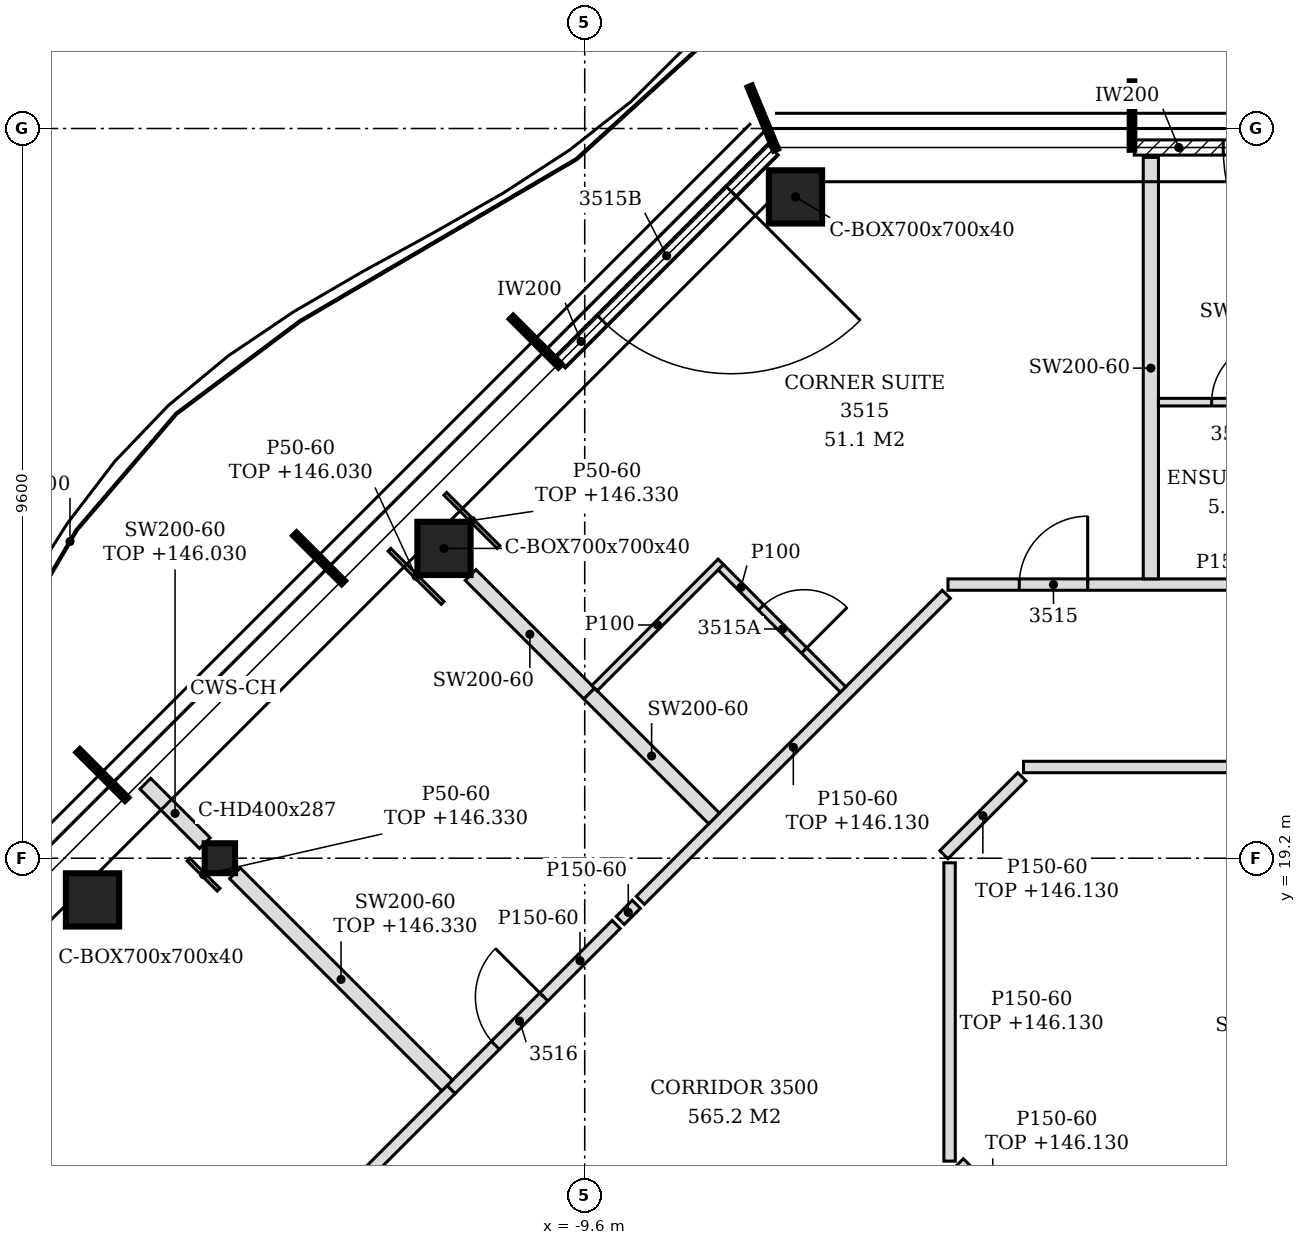
"""IFC4 building model, lengths in metres.
Left out: names, types, materials, properties, quantities, classifications, styles, units other than length and angle.
Written with IfcOpenShell. Run it as: python <this file> out.ifc"""

import sys

from ifc_helpers import new_model, si_unit, direction, frame, frame_2d, origin, origin_2d, place, context, subcontext, project, spatial, polyline, rectangle, hollow_rectangle, i_section, outline, extrude, element, fill, save


model = new_model("IFC4")
c1 = context("Model", 3, precision=1e-05, world=origin(), true_north=direction((0.0, 1.0)))
c2 = subcontext(c1, "Body", "Model", "MODEL_VIEW")
j1 = project(units=[si_unit("LENGTHUNIT", "METRE"), si_unit("PLANEANGLEUNIT", "RADIAN")], contexts=[c1])
p1 = place(None, origin())
s1 = spatial("IfcSite", under=j1, at=p1, CompositionType="ELEMENT")
p2 = place(p1, origin())
s2 = spatial("IfcBuilding", under=s1, at=p2, CompositionType="ELEMENT")
p3 = place(p2, frame((0.0, 0.0, 143.4)))
s3 = spatial("IfcBuildingStorey", under=s2, at=p3, CompositionType="ELEMENT", Elevation=143.4)
for number, where, z_axis, x_axis in (
    (1, (-6.827, 27.9, -0.15), (0.0, 0.0, 1.0), (1.0, 0.0, 0.0)),
    (2, (-11.451, 23.276, -0.15), (0.0, 0.0, 1.0), (1.0, 0.0, 0.0)),
    (3, (-16.076, 18.652, -0.15), (0.0, 0.0, 1.0), (1.0, 0.0, 0.0)),
):
    element("IfcColumn", number, at=place(p3, frame(where, z_axis=z_axis, x_axis=x_axis)), inside=s3, PredefinedType="COLUMN", context=c2, shape_type="SweptSolid", body=[
        extrude(hollow_rectangle(XDim=0.7, YDim=0.7, WallThickness=0.04, at=origin_2d()), origin(), (0.0, 0.0, 1.0), 3.6),
    ])
p4 = place(p3, frame((-14.4, 19.2, -0.15), z_axis=(0.0, 0.0, 1.0), x_axis=(1.0, 0.0, 0.0)))
e4 = element("IfcColumn", 4, at=p4, inside=s3, PredefinedType="COLUMN", context=c2, shape_type="SweptSolid", body=[
    extrude(i_section(OverallWidth=0.399, OverallDepth=0.393, WebThickness=0.023, FlangeThickness=0.037, FilletRadius=0.015, at=origin_2d()), origin(), (0.0, 0.0, 1.0), 3.6),
])
p5 = place(p3, frame((2.37, 28.55, 0.0), z_axis=(0.0, 0.0, 1.0), x_axis=(-1.0, 0.0, 0.0)))
e5 = element("IfcWall", 5, at=p5, inside=s3, PredefinedType="NOTDEFINED", context=c2, shape_type="SweptSolid", body=[
    extrude(rectangle(XDim=4.74, YDim=0.2, at=frame_2d((2.37, 0.0))), origin(), (0.0, 0.0, 1.0), 3.45),
])
p6 = place(p5, frame((1.17, 0.0, 0.0)))
e6 = element("IfcOpeningElement", 6, at=p6, cuts=e5, PredefinedType="OPENING", context=c2, shape_type="SweptSolid", body=[
    extrude(rectangle(XDim=2.4, YDim=2.4, at=frame_2d((1.2, 1.2))), frame((0.0, 0.11, 0.0), z_axis=(0.0, -1.0, 0.0), x_axis=(1.0, 0.0, 0.0)), (0.0, 0.0, 1.0), 0.22),
])
p7 = place(p3, frame((-7.125, 28.522, 0.0), z_axis=(0.0, 0.0, 1.0), x_axis=(-0.707106781187, -0.707106781187, 0.0)))
e7 = element("IfcWall", 7, at=p7, inside=s3, PredefinedType="NOTDEFINED", context=c2, shape_type="SweptSolid", body=[
    extrude(rectangle(XDim=3.962, YDim=0.2, at=frame_2d((1.981, 0.0))), origin(), (0.0, 0.0, 1.0), 3.45),
])
p8 = place(p7, frame((0.775, 0.0, 0.0)))
e8 = element("IfcOpeningElement", 8, at=p8, cuts=e7, PredefinedType="OPENING", context=c2, shape_type="SweptSolid", body=[
    extrude(rectangle(XDim=2.4, YDim=2.4, at=frame_2d((1.2, 1.2))), frame((0.0, 0.11, 0.0), z_axis=(0.0, -1.0, 0.0), x_axis=(1.0, 0.0, 0.0)), (0.0, 0.0, 1.0), 0.22),
])
p9 = place(p3, frame((-15.675, 11.84, 0.0), z_axis=(0.0, 0.0, 1.0), x_axis=(0.707206735496, 0.707006812746, 0.0)))
e9 = element("IfcWall", 9, at=p9, inside=s3, PredefinedType="PARTITIONING", context=c2, shape_type="SweptSolid", body=[
    extrude(rectangle(XDim=6.106, YDim=0.15, at=frame_2d((3.053, 0.0))), origin(), (0.0, 0.0, 1.0), 2.93),
])
p10 = place(p9, frame((2.656, 0.0, 0.0)))
e10 = element("IfcOpeningElement", 10, at=p10, cuts=e9, PredefinedType="OPENING", context=c2, shape_type="SweptSolid", body=[
    extrude(rectangle(XDim=0.9, YDim=2.1, at=frame_2d((0.45, 1.05))), frame((0.0, 0.085, 0.0), z_axis=(0.0, -1.0, 0.0), x_axis=(1.0, 0.0, 0.0)), (0.0, 0.0, 1.0), 0.17),
])
p11 = place(p3, frame((-3.792, 14.314, 0.0), z_axis=(0.0, 0.0, 1.0), x_axis=(-0.707499182195, 0.706714162298, 0.0)))
e11 = element("IfcWall", 11, at=p11, inside=s3, PredefinedType="PARTITIONING", context=c2, shape_type="SweptSolid", body=[
    extrude(rectangle(XDim=1.244, YDim=0.15, at=frame_2d((0.622, 0.0))), origin(), (0.0, 0.0, 1.0), 2.73),
])
p12 = place(p3, frame((-4.8, 15.215, 0.0), z_axis=(0.0, 0.0, 1.0), x_axis=(0.0, 1.0, 0.0)))
e12 = element("IfcWall", 12, at=p12, inside=s3, PredefinedType="PARTITIONING", context=c2, shape_type="SweptSolid", body=[
    extrude(rectangle(XDim=3.925, YDim=0.15, at=frame_2d((1.962, 0.0))), origin(), (0.0, 0.0, 1.0), 2.73),
])
p13 = place(p3, frame((-11.357, 16.157, 0.0), z_axis=(0.0, 0.0, 1.0), x_axis=(0.707106781187, 0.707106781187, 0.0)))
e13 = element("IfcWall", 13, at=p13, inside=s3, PredefinedType="PARTITIONING", context=c2, shape_type="SweptSolid", body=[
    extrude(rectangle(XDim=3.071, YDim=0.15, at=frame_2d((1.535, 0.0))), origin(), (0.0, 0.0, 1.0), 3.45),
])
p14 = place(p13, frame((0.823, 0.0, 0.0)))
e14 = element("IfcOpeningElement", 14, at=p14, cuts=e13, PredefinedType="OPENING", context=c2, shape_type="SweptSolid", body=[
    extrude(rectangle(XDim=0.9, YDim=2.1, at=frame_2d((0.45, 1.05))), frame((0.0, 0.085, 0.0), z_axis=(0.0, -1.0, 0.0), x_axis=(1.0, 0.0, 0.0)), (0.0, 0.0, 1.0), 0.17),
])
p15 = place(p3, frame((-11.41, 16.21, 0.0), z_axis=(0.0, 0.0, 1.0), x_axis=(-0.707106781187, 0.707106781187, 0.0)))
e15 = element("IfcWall", 15, at=p15, inside=s3, PredefinedType="PARTITIONING", context=c2, shape_type="SweptSolid", body=[
    extrude(rectangle(XDim=3.948, YDim=0.2, at=frame_2d((1.974, 0.0))), origin(), (0.0, 0.0, 1.0), 2.93),
])
p16 = place(p3, frame((-9.133, 18.382, 0.0), z_axis=(0.0, 0.0, 1.0), x_axis=(0.707106781187, 0.707106781187, 0.0)))
e16 = element("IfcWall", 16, at=p16, inside=s3, PredefinedType="PARTITIONING", context=c2, shape_type="SweptSolid", body=[
    extrude(rectangle(XDim=0.3, YDim=0.15, at=frame_2d((0.15, 0.0))), origin(), (0.0, 0.0, 1.0), 3.45),
])
p17 = place(p3, frame((-8.868, 18.647, 0.0), z_axis=(0.0, 0.0, 1.0), x_axis=(0.707085337138, 0.707128224585, 0.0)))
e17 = element("IfcWall", 17, at=p17, inside=s3, PredefinedType="PARTITIONING", context=c2, shape_type="SweptSolid", body=[
    extrude(rectangle(XDim=5.693, YDim=0.15, at=frame_2d((2.846, 0.0))), origin(), (0.0, 0.0, 1.0), 2.73),
])
p18 = place(p3, frame((-4.875, 19.246, 0.0), z_axis=(0.0, 0.0, 1.0), x_axis=(0.707106781187, 0.707106781187, 0.0)))
e18 = element("IfcWall", 18, at=p18, inside=s3, PredefinedType="PARTITIONING", context=c2, shape_type="SweptSolid", body=[
    extrude(rectangle(XDim=1.451, YDim=0.15, at=frame_2d((0.726, 0.0))), origin(), (0.0, 0.0, 1.0), 2.73),
])
p19 = place(p3, frame((-14.598, 19.398, 0.0), z_axis=(0.0, 0.0, 1.0), x_axis=(-0.707106781187, 0.707106781187, 0.0)))
e19 = element("IfcWall", 19, at=p19, inside=s3, PredefinedType="PARTITIONING", context=c2, shape_type="SweptSolid", body=[
    extrude(rectangle(XDim=1.107, YDim=0.2, at=frame_2d((0.554, 0.0))), origin(), (0.0, 0.0, 1.0), 2.63),
])
p20 = place(p3, frame((-7.898, 19.723, 0.0), z_axis=(0.0, 0.0, 1.0), x_axis=(-0.707106781187, 0.707106781187, 0.0)))
e20 = element("IfcWall", 20, at=p20, inside=s3, PredefinedType="PARTITIONING", context=c2, shape_type="SweptSolid", body=[
    extrude(rectangle(XDim=2.325, YDim=0.2, at=frame_2d((1.163, 0.0))), origin(), (0.0, 0.0, 1.0), 3.45),
])
p21 = place(p3, frame((-3.827, 20.4, 0.0), z_axis=(0.0, 0.0, 1.0), x_axis=(1.0, 0.0, 0.0)))
e21 = element("IfcWall", 21, at=p21, inside=s3, PredefinedType="PARTITIONING", context=c2, shape_type="SweptSolid", body=[
    extrude(rectangle(XDim=8.702, YDim=0.15, at=frame_2d((4.351, 0.0))), origin(), (0.0, 0.0, 1.0), 3.45),
])
p22 = place(p3, frame((-9.542, 21.367, 0.0), z_axis=(0.0, 0.0, 1.0), x_axis=(-0.707217500167, 0.706996044867, 0.0)))
e22 = element("IfcWall", 22, at=p22, inside=s3, PredefinedType="PARTITIONING", context=c2, shape_type="SweptSolid", body=[
    extrude(rectangle(XDim=2.205, YDim=0.2, at=frame_2d((1.103, 0.0))), origin(), (0.0, 0.0, 1.0), 3.45),
])
p23 = place(p3, frame((-9.471, 21.438, 0.0), z_axis=(0.0, 0.0, 1.0), x_axis=(0.707054828152, 0.707158730404, 0.0)))
e23 = element("IfcWall", 23, at=p23, inside=s3, PredefinedType="PARTITIONING", context=c2, shape_type="SweptSolid", body=[
    extrude(rectangle(XDim=2.35, YDim=0.1, at=frame_2d((1.175, 0.0))), origin(), (0.0, 0.0, 1.0), 3.45),
])
p24 = place(p3, frame((-6.201, 21.42, 0.0), z_axis=(0.0, 0.0, 1.0), x_axis=(-0.707106781187, 0.707106781187, 0.0)))
e24 = element("IfcWall", 24, at=p24, inside=s3, PredefinedType="PARTITIONING", context=c2, shape_type="SweptSolid", body=[
    extrude(rectangle(XDim=2.275, YDim=0.1, at=frame_2d((1.137, 0.0))), origin(), (0.0, 0.0, 1.0), 3.45),
])
p25 = place(p24, frame((0.725, 0.0, 0.0)))
e25 = element("IfcOpeningElement", 25, at=p25, cuts=e24, PredefinedType="OPENING", context=c2, shape_type="SweptSolid", body=[
    extrude(rectangle(XDim=0.8, YDim=2.1, at=frame_2d((0.4, 1.05))), frame((0.0, 0.06, 0.0), z_axis=(0.0, -1.0, 0.0), x_axis=(1.0, 0.0, 0.0)), (0.0, 0.0, 1.0), 0.12),
])
p26 = place(p3, frame((-4.821, 22.8, 0.0), z_axis=(0.0, 0.0, 1.0), x_axis=(1.0, 0.0, 0.0)))
e26 = element("IfcWall", 26, at=p26, inside=s3, PredefinedType="PARTITIONING", context=c2, shape_type="SweptSolid", body=[
    extrude(outline(polyline([(0.0, 0.0), (24.042, 0.0), (24.042, 2.73), (23.871, 2.73), (23.869, 3.45), (12.171, 3.45), (12.169, 2.73), (11.871, 2.73), (11.869, 3.45), (0.171, 3.45), (0.169, 2.73), (0.0, 2.73), (0.0, 0.0)])), frame((0.0, 0.075, 0.0), z_axis=(0.0, -1.0, 0.0), x_axis=(1.0, 0.0, 0.0)), (0.0, 0.0, 1.0), 0.15),
])
p27 = place(p26, frame((22.205, 0.0, 0.0)))
e27 = element("IfcOpeningElement", 27, at=p27, cuts=e26, PredefinedType="OPENING", context=c2, shape_type="SweptSolid", body=[
    extrude(rectangle(XDim=0.9, YDim=2.1, at=frame_2d((0.45, 1.05))), frame((0.0, 0.085, 0.0), z_axis=(0.0, -1.0, 0.0), x_axis=(1.0, 0.0, 0.0)), (0.0, 0.0, 1.0), 0.17),
])
p28 = place(p26, frame((19.785, 0.0, 0.0)))
e28 = element("IfcOpeningElement", 28, at=p28, cuts=e26, PredefinedType="OPENING", context=c2, shape_type="SweptSolid", body=[
    extrude(rectangle(XDim=0.9, YDim=2.1, at=frame_2d((0.45, 1.05))), frame((0.0, 0.085, 0.0), z_axis=(0.0, -1.0, 0.0), x_axis=(1.0, 0.0, 0.0)), (0.0, 0.0, 1.0), 0.17),
])
p29 = place(p26, frame((15.109, 0.0, 0.0)))
e29 = element("IfcOpeningElement", 29, at=p29, cuts=e26, PredefinedType="OPENING", context=c2, shape_type="SweptSolid", body=[
    extrude(rectangle(XDim=0.9, YDim=2.1, at=frame_2d((0.45, 1.05))), frame((0.0, 0.085, 0.0), z_axis=(0.0, -1.0, 0.0), x_axis=(1.0, 0.0, 0.0)), (0.0, 0.0, 1.0), 0.17),
])
p30 = place(p26, frame((10.433, 0.0, 0.0)))
e30 = element("IfcOpeningElement", 30, at=p30, cuts=e26, PredefinedType="OPENING", context=c2, shape_type="SweptSolid", body=[
    extrude(rectangle(XDim=0.9, YDim=2.1, at=frame_2d((0.45, 1.05))), frame((0.0, 0.085, 0.0), z_axis=(0.0, -1.0, 0.0), x_axis=(1.0, 0.0, 0.0)), (0.0, 0.0, 1.0), 0.17),
])
p31 = place(p26, frame((5.757, 0.0, 0.0)))
e31 = element("IfcOpeningElement", 31, at=p31, cuts=e26, PredefinedType="OPENING", context=c2, shape_type="SweptSolid", body=[
    extrude(rectangle(XDim=0.9, YDim=2.1, at=frame_2d((0.45, 1.05))), frame((0.0, 0.085, 0.0), z_axis=(0.0, -1.0, 0.0), x_axis=(1.0, 0.0, 0.0)), (0.0, 0.0, 1.0), 0.17),
])
p32 = place(p26, frame((0.938, 0.0, 0.0)))
e32 = element("IfcOpeningElement", 32, at=p32, cuts=e26, PredefinedType="OPENING", context=c2, shape_type="SweptSolid", body=[
    extrude(rectangle(XDim=0.9, YDim=2.1, at=frame_2d((0.45, 1.05))), frame((0.0, 0.085, 0.0), z_axis=(0.0, -1.0, 0.0), x_axis=(1.0, 0.0, 0.0)), (0.0, 0.0, 1.0), 0.17),
])
p33 = place(p3, frame((-2.152, 22.875, 0.0), z_axis=(0.0, 0.0, 1.0), x_axis=(0.0, 1.0, 0.0)))
e33 = element("IfcWall", 33, at=p33, inside=s3, PredefinedType="PARTITIONING", context=c2, shape_type="SweptSolid", body=[
    extrude(outline(polyline([(0.0, 0.0), (5.545, 0.0), (5.545, 3.45), (5.175, 3.45), (5.173, 2.93), (4.875, 2.93), (4.873, 3.45), (1.23, 3.45), (1.228, 2.88), (1.02, 2.88), (1.018, 3.45), (0.0, 3.45), (0.0, 0.0)])), frame((0.0, 0.1, 0.0), z_axis=(0.0, -1.0, 0.0), x_axis=(1.0, 0.0, 0.0)), (0.0, 0.0, 1.0), 0.2),
])
p34 = place(p3, frame((-2.052, 25.2, 0.0), z_axis=(0.0, 0.0, 1.0), x_axis=(1.0, 0.0, 0.0)))
e34 = element("IfcWall", 34, at=p34, inside=s3, PredefinedType="PARTITIONING", context=c2, shape_type="SweptSolid", body=[
    extrude(rectangle(XDim=2.35, YDim=0.1, at=frame_2d((1.175, 0.0))), origin(), (0.0, 0.0, 1.0), 3.45),
])
p35 = place(p34, frame((0.7, 0.0, 0.0)))
e35 = element("IfcOpeningElement", 35, at=p35, cuts=e34, PredefinedType="OPENING", context=c2, shape_type="SweptSolid", body=[
    extrude(rectangle(XDim=0.8, YDim=2.1, at=frame_2d((0.4, 1.05))), frame((0.0, 0.06, 0.0), z_axis=(0.0, -1.0, 0.0), x_axis=(1.0, 0.0, 0.0)), (0.0, 0.0, 1.0), 0.12),
])
p36 = place(p3, frame((-14.418, 18.786, 0.0), z_axis=(0.0, 0.0, 1.0), x_axis=(-0.707106781187, 0.707106781187, 0.0)))
e36 = element("IfcWall", 36, at=p36, inside=s3, PredefinedType="PARTITIONING", context=c2, shape_type="SweptSolid", body=[
    extrude(rectangle(XDim=0.56, YDim=0.05, at=frame_2d((0.28, 0.0))), origin(), (0.0, 0.0, 1.0), 2.93),
])
p37 = place(p3, frame((-11.469, 22.558, 0.0), z_axis=(0.0, 0.0, 1.0), x_axis=(-0.707353374636, 0.706860101711, 0.0)))
e37 = element("IfcWall", 37, at=p37, inside=s3, PredefinedType="PARTITIONING", context=c2, shape_type="SweptSolid", body=[
    extrude(rectangle(XDim=0.99, YDim=0.05, at=frame_2d((0.495, 0.0))), origin(), (0.0, 0.0, 1.0), 2.63),
])
p38 = place(p3, frame((-10.734, 23.293, 0.0), z_axis=(0.0, 0.0, 1.0), x_axis=(-0.707230067171, 0.706983473703, 0.0)))
e38 = element("IfcWall", 38, at=p38, inside=s3, PredefinedType="PARTITIONING", context=c2, shape_type="SweptSolid", body=[
    extrude(rectangle(XDim=0.99, YDim=0.05, at=frame_2d((0.495, 0.0))), origin(), (0.0, 0.0, 1.0), 2.93),
])
p39 = place(p6, origin())
e39 = element("IfcDoor", 39, at=p39, inside=s3, OperationType="SINGLE_SWING_LEFT", PredefinedType="DOOR", context=c2, shape_type="SweptSolid", body=[
    extrude(rectangle(XDim=2.4, YDim=2.4, at=frame_2d((1.2, 1.2))), frame((0.0, 0.025, 0.0), z_axis=(0.0, -1.0, 0.0), x_axis=(1.0, 0.0, 0.0)), (0.0, 0.0, 1.0), 0.05),
])
fill(e6, e39)
p40 = place(p8, origin())
e40 = element("IfcDoor", 40, at=p40, inside=s3, OperationType="SINGLE_SWING_LEFT", PredefinedType="DOOR", context=c2, shape_type="SweptSolid", body=[
    extrude(rectangle(XDim=2.4, YDim=2.4, at=frame_2d((1.2, 1.2))), frame((0.0, 0.025, 0.0), z_axis=(0.0, -1.0, 0.0), x_axis=(1.0, 0.0, 0.0)), (0.0, 0.0, 1.0), 0.05),
])
fill(e8, e40)
p41 = place(p35, origin())
e41 = element("IfcDoor", 41, at=p41, inside=s3, OperationType="SINGLE_SWING_RIGHT", PredefinedType="DOOR", context=c2, shape_type="SweptSolid", body=[
    extrude(rectangle(XDim=0.8, YDim=2.1, at=frame_2d((0.4, 1.05))), frame((0.0, 0.025, 0.0), z_axis=(0.0, -1.0, 0.0), x_axis=(1.0, 0.0, 0.0)), (0.0, 0.0, 1.0), 0.05),
])
fill(e35, e41)
p42 = place(p32, origin())
e42 = element("IfcDoor", 42, at=p42, inside=s3, OperationType="SINGLE_SWING_RIGHT", PredefinedType="DOOR", context=c2, shape_type="SweptSolid", body=[
    extrude(rectangle(XDim=0.9, YDim=2.1, at=frame_2d((0.45, 1.05))), frame((0.0, 0.025, 0.0), z_axis=(0.0, -1.0, 0.0), x_axis=(1.0, 0.0, 0.0)), (0.0, 0.0, 1.0), 0.05),
])
fill(e32, e42)
p43 = place(p25, frame((0.8, 0.0, 0.0), z_axis=(0.0, 0.0, 1.0), x_axis=(-1.0, 0.0, 0.0)))
e43 = element("IfcDoor", 43, at=p43, inside=s3, OperationType="SINGLE_SWING_RIGHT", PredefinedType="DOOR", context=c2, shape_type="SweptSolid", body=[
    extrude(rectangle(XDim=0.8, YDim=2.1, at=frame_2d((0.4, 1.05))), frame((0.0, 0.025, 0.0), z_axis=(0.0, -1.0, 0.0), x_axis=(1.0, 0.0, 0.0)), (0.0, 0.0, 1.0), 0.05),
])
fill(e25, e43)
p44 = place(p14, origin())
e44 = element("IfcDoor", 44, at=p44, inside=s3, OperationType="SINGLE_SWING_RIGHT", PredefinedType="DOOR", context=c2, shape_type="SweptSolid", body=[
    extrude(rectangle(XDim=0.9, YDim=2.1, at=frame_2d((0.45, 1.05))), frame((0.0, 0.025, 0.0), z_axis=(0.0, -1.0, 0.0), x_axis=(1.0, 0.0, 0.0)), (0.0, 0.0, 1.0), 0.05),
])
fill(e14, e44)
save(model, sys.argv[1])
